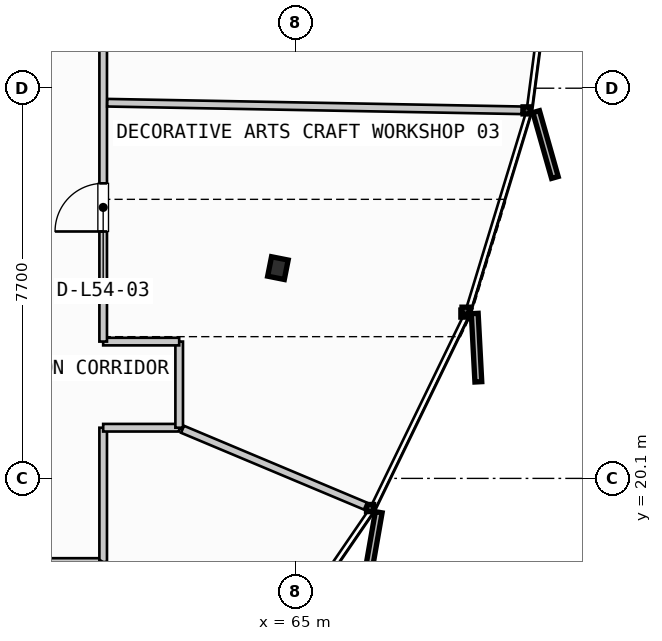
"""IFC4 building model, lengths in metres.
Left out: names, types, materials, properties, quantities, classifications, styles, units other than length and angle.
Written with IfcOpenShell. Run it as: python <this file> out.ifc"""

import sys

from ifc_helpers import new_model, si_unit, direction, frame, frame_2d, origin, origin_2d, place, context, subcontext, project, spatial, rectangle, i_section, extrude, source, transform, mapped, element, fill, save


model = new_model("IFC4")
c1 = context("Model", 3, precision=1e-05, world=origin(), true_north=direction((0.0, 1.0)))
c2 = subcontext(c1, "Body", "Model", "MODEL_VIEW")
j1 = project(units=[si_unit("LENGTHUNIT", "METRE"), si_unit("PLANEANGLEUNIT", "RADIAN")], contexts=[c1])
p1 = place(None, origin())
s1 = spatial("IfcSite", under=j1, at=p1, CompositionType="ELEMENT")
p2 = place(p1, origin())
s2 = spatial("IfcBuilding", under=s1, at=p2, CompositionType="ELEMENT")
p3 = place(p2, frame((0.0, 0.0, 207.9)))
s3 = spatial("IfcBuildingStorey", under=s2, at=p3, CompositionType="ELEMENT", Elevation=207.9)
m1 = source(origin(), c2, "Body", "SweptSolid", [
    extrude(i_section(OverallWidth=0.391, OverallDepth=0.335, WebThickness=0.023, FlangeThickness=0.034, FilletRadius=0.015, at=origin_2d()), origin(), (0.0, 0.0, 1.0), 3.26),
])
p4 = place(p3, frame((64.649, 24.25, 0.0), z_axis=(0.0, 0.0, 1.0), x_axis=(0.980785280403, -0.195090322016, 0.0)))
e1 = element("IfcColumn", 1, at=p4, inside=s3, PredefinedType="COLUMN", context=c2, shape_type="MappedRepresentation", body=[
    mapped(m1, transform((0.0, 0.0, 0.0), scale=1.0)),
])
p5 = place(p3, frame((32.85, 18.45, 0.0), z_axis=(0.0, 0.0, 1.0), x_axis=(1.0, 0.0, 0.0)))
e2 = element("IfcWall", 2, at=p5, inside=s3, PredefinedType="PARTITIONING", context=c2, shape_type="SweptSolid", body=[
    extrude(rectangle(XDim=28.35, YDim=0.15, at=frame_2d((14.175, 0.0))), origin(), (0.0, 0.0, 1.0), 2.455),
])
p6 = place(p5, frame((4.951, 0.0, 0.0)))
e3 = element("IfcOpeningElement", 3, at=p6, cuts=e2, PredefinedType="OPENING", context=c2, shape_type="SweptSolid", body=[
    extrude(rectangle(XDim=0.95, YDim=2.15, at=frame_2d((0.475, 1.075))), frame((0.0, 0.085, 0.0), z_axis=(0.0, -1.0, 0.0), x_axis=(1.0, 0.0, 0.0)), (0.0, 0.0, 1.0), 0.17),
])
p7 = place(p5, frame((18.536, 0.0, 0.0)))
e4 = element("IfcOpeningElement", 4, at=p7, cuts=e2, PredefinedType="OPENING", context=c2, shape_type="SweptSolid", body=[
    extrude(rectangle(XDim=0.95, YDim=2.15, at=frame_2d((0.475, 1.075))), frame((0.0, 0.085, 0.0), z_axis=(0.0, -1.0, 0.0), x_axis=(1.0, 0.0, 0.0)), (0.0, 0.0, 1.0), 0.17),
])
p8 = place(p3, frame((61.2, 18.45, 0.0), z_axis=(0.0, 0.0, 1.0), x_axis=(0.0, 1.0, 0.0)))
e5 = element("IfcWall", 5, at=p8, inside=s3, PredefinedType="PARTITIONING", context=c2, shape_type="SweptSolid", body=[
    extrude(rectangle(XDim=2.65, YDim=0.15, at=frame_2d((1.325, 0.0))), origin(), (0.0, 0.0, 1.0), 2.455),
])
p9 = place(p3, frame((61.2, 21.1, 0.0), z_axis=(0.0, 0.0, 1.0), x_axis=(1.0, 0.0, 0.0)))
e6 = element("IfcWall", 6, at=p9, inside=s3, PredefinedType="PARTITIONING", context=c2, shape_type="SweptSolid", body=[
    extrude(rectangle(XDim=1.5, YDim=0.15, at=frame_2d((0.75, 0.0))), origin(), (0.0, 0.0, 1.0), 2.455),
])
p10 = place(p3, frame((62.7, 21.1, 0.0), z_axis=(0.0, 0.0, 1.0), x_axis=(0.0, 1.0, 0.0)))
e7 = element("IfcWall", 7, at=p10, inside=s3, PredefinedType="PARTITIONING", context=c2, shape_type="SweptSolid", body=[
    extrude(rectangle(XDim=1.7, YDim=0.15, at=frame_2d((0.85, 0.0))), origin(), (0.0, 0.0, 1.0), 2.455),
])
p11 = place(p3, frame((62.7, 22.8, 0.0), z_axis=(0.0, 0.0, 1.0), x_axis=(-1.0, 0.0, 0.0)))
e8 = element("IfcWall", 8, at=p11, inside=s3, PredefinedType="PARTITIONING", context=c2, shape_type="SweptSolid", body=[
    extrude(rectangle(XDim=1.5, YDim=0.15, at=frame_2d((0.75, 0.0))), origin(), (0.0, 0.0, 1.0), 2.455),
])
p12 = place(p3, frame((61.2, 22.8, 0.0), z_axis=(0.0, 0.0, 1.0), x_axis=(0.0, 1.0, 0.0)))
e9 = element("IfcWall", 9, at=p12, inside=s3, PredefinedType="PARTITIONING", context=c2, shape_type="SweptSolid", body=[
    extrude(rectangle(XDim=10.0, YDim=0.15, at=frame_2d((5.0, 0.0))), origin(), (0.0, 0.0, 1.0), 2.455),
])
p13 = place(p12, frame((2.173, 0.0, 0.0)))
e10 = element("IfcOpeningElement", 10, at=p13, cuts=e9, PredefinedType="OPENING", context=c2, shape_type="SweptSolid", body=[
    extrude(rectangle(XDim=0.95, YDim=2.15, at=frame_2d((0.475, 1.075))), frame((0.0, 0.085, 0.0), z_axis=(0.0, -1.0, 0.0), x_axis=(1.0, 0.0, 0.0)), (0.0, 0.0, 1.0), 0.17),
])
p14 = place(p12, frame((6.593, 0.0, 0.0)))
e11 = element("IfcOpeningElement", 11, at=p14, cuts=e9, PredefinedType="OPENING", context=c2, shape_type="SweptSolid", body=[
    extrude(rectangle(XDim=0.95, YDim=2.15, at=frame_2d((0.475, 1.075))), frame((0.0, 0.085, 0.0), z_axis=(0.0, -1.0, 0.0), x_axis=(1.0, 0.0, 0.0)), (0.0, 0.0, 1.0), 0.17),
])
p15 = place(p3, frame((62.766, 21.069, 0.0), z_axis=(0.0, 0.0, 1.0), x_axis=(0.922014169655, -0.387156132529, 0.0)))
e12 = element("IfcWall", 12, at=p15, inside=s3, PredefinedType="PARTITIONING", context=c2, shape_type="SweptSolid", body=[
    extrude(rectangle(XDim=3.914, YDim=0.15, at=frame_2d((1.957, 0.0))), origin(), (0.0, 0.0, 1.0), 2.455),
])
p16 = place(p3, frame((61.28, 27.514, 0.0), z_axis=(0.0, 0.0, 1.0), x_axis=(0.999832007768, -0.01832910915, 0.0)))
e13 = element("IfcWall", 13, at=p16, inside=s3, PredefinedType="PARTITIONING", context=c2, shape_type="SweptSolid", body=[
    extrude(rectangle(XDim=8.178, YDim=0.15, at=frame_2d((4.089, 0.0))), origin(), (0.0, 0.0, 1.0), 2.455),
])
m2 = source(origin(), c2, "Body", "SweptSolid", [
    extrude(rectangle(XDim=0.95, YDim=2.15, at=frame_2d((0.475, 1.075))), frame((0.0, 0.025, 0.0), z_axis=(0.0, -1.0, 0.0), x_axis=(1.0, 0.0, 0.0)), (0.0, 0.0, 1.0), 0.05),
])
p17 = place(p13, origin())
e14 = element("IfcDoor", 14, at=p17, inside=s3, OperationType="SINGLE_SWING_LEFT", PredefinedType="DOOR", context=c2, shape_type="MappedRepresentation", body=[
    mapped(m2, transform((0.0, 0.0, 0.0), scale=1.0)),
])
fill(e10, e14)
save(model, sys.argv[1])
